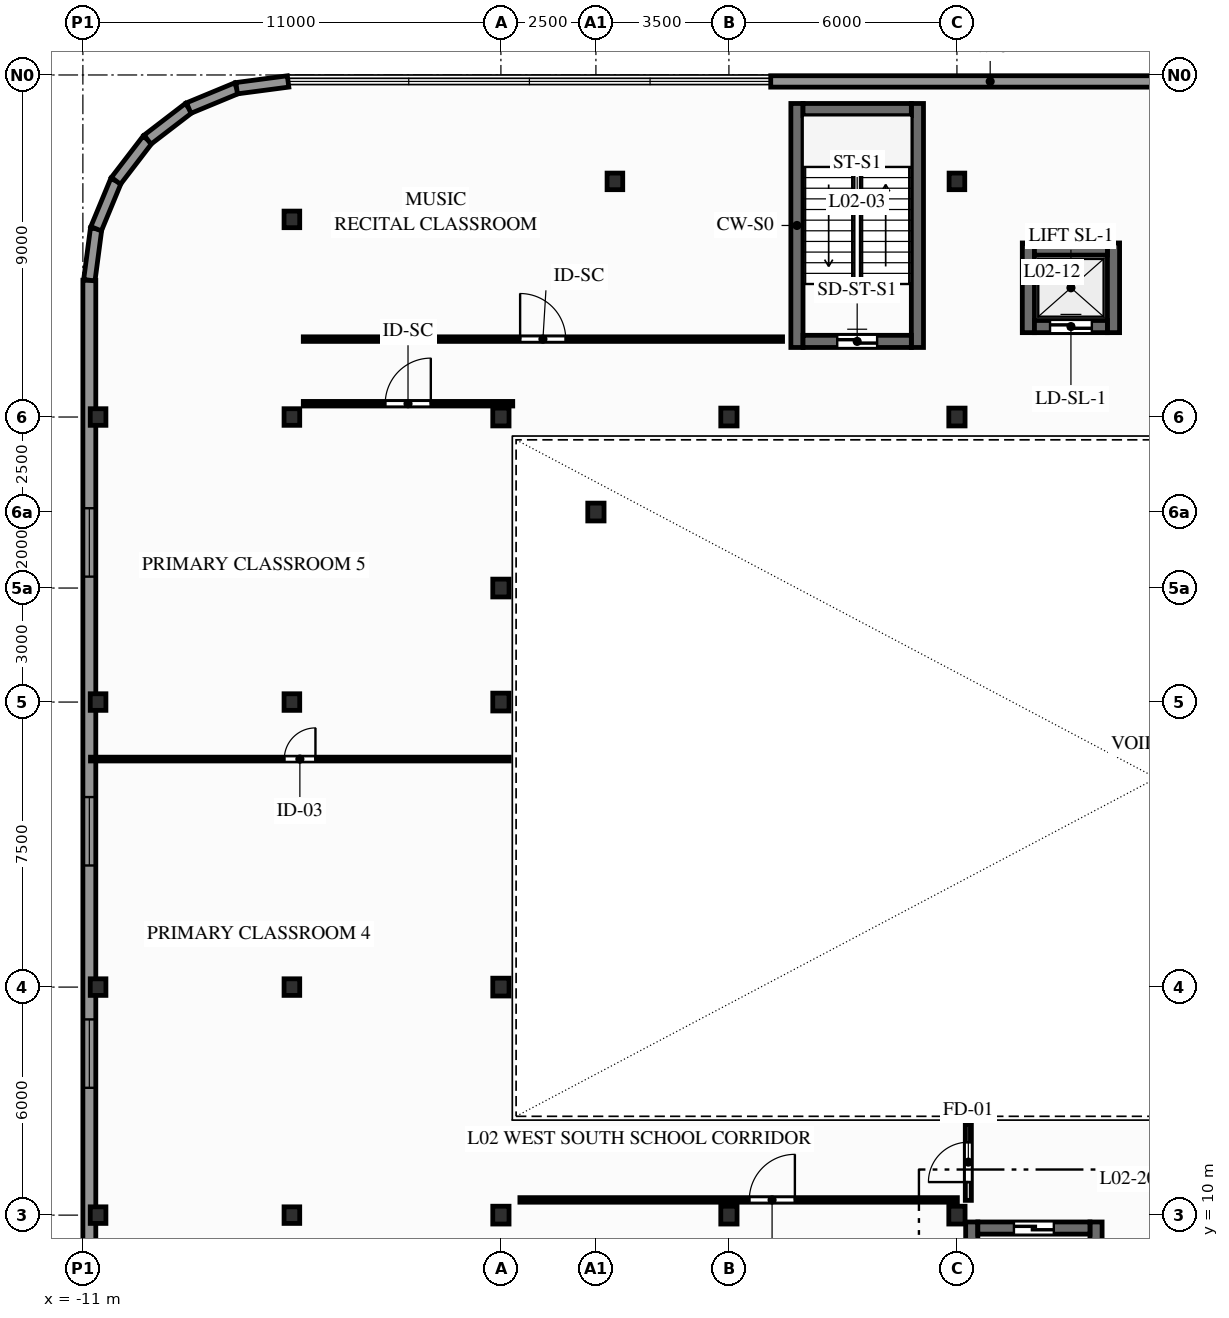
"""IFC4 building model, lengths in metres.
Left out: names, types, materials, properties, quantities, classifications, styles, units other than length and angle.
Written with IfcOpenShell. Run it as: python <this file> out.ifc"""

import sys

from ifc_helpers import new_model, si_unit, direction, frame, frame_2d, origin, origin_2d, place, context, subcontext, project, spatial, rectangle, i_section, extrude, element, fill, save


model = new_model("IFC4")
c1 = context("Model", 3, precision=1e-05, world=origin(), true_north=direction((0.0, 1.0)))
c2 = subcontext(c1, "Body", "Model", "MODEL_VIEW")
j1 = project(units=[si_unit("LENGTHUNIT", "METRE"), si_unit("PLANEANGLEUNIT", "RADIAN")], contexts=[c1])
p1 = place(None, origin())
s1 = spatial("IfcSite", under=j1, at=p1, CompositionType="ELEMENT")
p2 = place(p1, origin())
s2 = spatial("IfcBuilding", under=s1, at=p2, CompositionType="ELEMENT")
p3 = place(p2, frame((0.0, 0.0, 9.0)))
s3 = spatial("IfcBuildingStorey", under=s2, at=p3, CompositionType="ELEMENT", Elevation=9.0)
for number, where, z_axis, x_axis in (
    (1, (-10.6, 10.0, 0.0), (0.0, 0.0, 1.0), (1.0, 0.0, 0.0)),
    (2, (-10.6, 16.0, 0.0), (0.0, 0.0, 1.0), (1.0, 0.0, 0.0)),
    (3, (-10.6, 23.5, 0.0), (0.0, 0.0, 1.0), (1.0, 0.0, 0.0)),
    (4, (-10.6, 31.0, 0.0), (0.0, 0.0, 1.0), (1.0, 0.0, 0.0)),
    (5, (-5.5, 10.0, 0.0), (0.0, 0.0, 1.0), (1.0, 0.0, 0.0)),
    (6, (-5.5, 16.0, 0.0), (0.0, 0.0, 1.0), (1.0, 0.0, 0.0)),
    (7, (-5.5, 23.5, 0.0), (0.0, 0.0, 1.0), (1.0, 0.0, 0.0)),
    (8, (-5.5, 31.0, 0.0), (0.0, 0.0, 1.0), (1.0, 0.0, 0.0)),
    (9, (-5.5, 36.2, 0.0), (0.0, 0.0, 1.0), (1.0, 0.0, 0.0)),
):
    element("IfcColumn", number, at=place(p3, frame(where, z_axis=z_axis, x_axis=x_axis)), inside=s3, PredefinedType="COLUMN", context=c2, shape_type="SweptSolid", body=[
        extrude(i_section(OverallWidth=0.412, OverallDepth=0.437, WebThickness=0.036, FlangeThickness=0.058, FilletRadius=0.015, at=origin_2d()), origin(), (0.0, 0.0, 1.0), 4.5),
    ])
for number, where, z_axis, x_axis in (
    (10, (0.0, 10.0, 0.0), (0.0, 0.0, 1.0), (1.0, 0.0, 0.0)),
    (11, (0.0, 16.0, 0.0), (0.0, 0.0, 1.0), (1.0, 0.0, 0.0)),
    (12, (0.0, 23.5, 0.0), (0.0, 0.0, 1.0), (1.0, 0.0, 0.0)),
    (13, (0.0, 26.5, 0.0), (0.0, 0.0, 1.0), (1.0, 0.0, 0.0)),
    (14, (0.0, 31.0, 0.0), (0.0, 0.0, 1.0), (1.0, 0.0, 0.0)),
    (15, (2.5, 28.5, 0.0), (0.0, 0.0, 1.0), (1.0, 0.0, 0.0)),
):
    element("IfcColumn", number, at=place(p3, frame(where, z_axis=z_axis, x_axis=x_axis)), inside=s3, PredefinedType="COLUMN", context=c2, shape_type="SweptSolid", body=[
        extrude(i_section(OverallWidth=0.428, OverallDepth=0.469, WebThickness=0.078, FlangeThickness=0.125, FilletRadius=0.015, at=origin_2d()), origin(), (0.0, 0.0, 1.0), 4.5),
    ])
p4 = place(p3, frame((3.0, 37.2, 0.0), z_axis=(0.0, 0.0, 1.0), x_axis=(1.0, 0.0, 0.0)))
e16 = element("IfcColumn", 16, at=p4, inside=s3, PredefinedType="COLUMN", context=c2, shape_type="SweptSolid", body=[
    extrude(i_section(OverallWidth=0.412, OverallDepth=0.437, WebThickness=0.036, FlangeThickness=0.058, FilletRadius=0.015, at=origin_2d()), origin(), (0.0, 0.0, 1.0), 4.5),
])
for number, where, z_axis, x_axis in (
    (17, (6.0, 10.0, 0.0), (0.0, 0.0, 1.0), (1.0, 0.0, 0.0)),
    (18, (6.0, 31.0, 0.0), (0.0, 0.0, 1.0), (1.0, 0.0, 0.0)),
    (19, (12.0, 10.0, 0.0), (0.0, 0.0, 1.0), (1.0, 0.0, 0.0)),
    (20, (12.0, 31.0, 0.0), (0.0, 0.0, 1.0), (1.0, 0.0, 0.0)),
):
    element("IfcColumn", number, at=place(p3, frame(where, z_axis=z_axis, x_axis=x_axis)), inside=s3, PredefinedType="COLUMN", context=c2, shape_type="SweptSolid", body=[
        extrude(i_section(OverallWidth=0.428, OverallDepth=0.469, WebThickness=0.078, FlangeThickness=0.125, FilletRadius=0.015, at=origin_2d()), origin(), (0.0, 0.0, 1.0), 4.5),
    ])
p5 = place(p3, frame((12.0, 37.2, 0.0), z_axis=(0.0, 0.0, 1.0), x_axis=(1.0, 0.0, 0.0)))
e21 = element("IfcColumn", 21, at=p5, inside=s3, PredefinedType="COLUMN", context=c2, shape_type="SweptSolid", body=[
    extrude(i_section(OverallWidth=0.412, OverallDepth=0.437, WebThickness=0.036, FlangeThickness=0.058, FilletRadius=0.015, at=origin_2d()), origin(), (0.0, 0.0, 1.0), 4.5),
])
p6 = place(p3, frame((-10.83, 34.6, 0.0), z_axis=(0.0, 0.0, 1.0), x_axis=(0.0, -1.0, 0.0)))
e22 = element("IfcWall", 22, at=p6, inside=s3, PredefinedType="STANDARD", context=c2, shape_type="SweptSolid", body=[
    extrude(rectangle(XDim=36.43, YDim=0.34, at=frame_2d((18.215, 0.0))), origin(), (0.0, 0.0, 1.0), 3.583),
])
p7 = place(p6, frame((28.3, 0.0, 0.9)))
e23 = element("IfcOpeningElement", 23, at=p7, cuts=e22, PredefinedType="OPENING", context=c2, shape_type="SweptSolid", body=[
    extrude(rectangle(XDim=1.8, YDim=1.95, at=frame_2d((0.9, 0.975))), frame((0.0, 0.18, 0.0), z_axis=(0.0, -1.0, 0.0), x_axis=(1.0, 0.0, 0.0)), (0.0, 0.0, 1.0), 0.36),
])
p8 = place(p6, frame((19.45, 0.0, 0.9)))
e24 = element("IfcOpeningElement", 24, at=p8, cuts=e22, PredefinedType="OPENING", context=c2, shape_type="SweptSolid", body=[
    extrude(rectangle(XDim=1.8, YDim=1.95, at=frame_2d((0.9, 0.975))), frame((0.0, 0.18, 0.0), z_axis=(0.0, -1.0, 0.0), x_axis=(1.0, 0.0, 0.0)), (0.0, 0.0, 1.0), 0.36),
])
p9 = place(p6, frame((13.6, 0.0, 0.9)))
e25 = element("IfcOpeningElement", 25, at=p9, cuts=e22, PredefinedType="OPENING", context=c2, shape_type="SweptSolid", body=[
    extrude(rectangle(XDim=1.8, YDim=1.95, at=frame_2d((0.9, 0.975))), frame((0.0, 0.18, 0.0), z_axis=(0.0, -1.0, 0.0), x_axis=(1.0, 0.0, 0.0)), (0.0, 0.0, 1.0), 0.36),
])
p10 = place(p6, frame((6.0, 0.0, 0.9)))
e26 = element("IfcOpeningElement", 26, at=p10, cuts=e22, PredefinedType="OPENING", context=c2, shape_type="SweptSolid", body=[
    extrude(rectangle(XDim=1.8, YDim=1.95, at=frame_2d((0.9, 0.975))), frame((0.0, 0.18, 0.0), z_axis=(0.0, -1.0, 0.0), x_axis=(1.0, 0.0, 0.0)), (0.0, 0.0, 1.0), 0.36),
])
p11 = place(p3, frame((-10.83, 34.6, 0.0), z_axis=(0.0, 0.0, 1.0), x_axis=(0.13054703207, 0.991442117533, 0.0)))
e27 = element("IfcWall", 27, at=p11, inside=s3, PredefinedType="STANDARD", context=c2, shape_type="SweptSolid", body=[
    extrude(rectangle(XDim=1.365, YDim=0.3, at=frame_2d((0.683, 0.0))), origin(), (0.0, 0.0, 1.0), 4.22),
])
p12 = place(p3, frame((-10.652, 35.954, 0.0), z_axis=(0.0, 0.0, 1.0), x_axis=(0.382646577594, 0.923894797396, 0.0)))
e28 = element("IfcWall", 28, at=p12, inside=s3, PredefinedType="STANDARD", context=c2, shape_type="SweptSolid", body=[
    extrude(rectangle(XDim=1.365, YDim=0.3, at=frame_2d((0.683, 0.0))), origin(), (0.0, 0.0, 1.0), 4.22),
])
for number, where, z_axis, x_axis in (
    (29, (-10.129, 37.215, 0.0), (0.0, 0.0, 1.0), (0.609, 0.793, 0.0)),
    (30, (-9.298, 38.298, 0.0), (0.0, 0.0, 1.0), (0.793, 0.609, 0.0)),
):
    element("IfcWall", number, at=place(p3, frame(where, z_axis=z_axis, x_axis=x_axis)), inside=s3, PredefinedType="STANDARD", context=c2, shape_type="SweptSolid", body=[
        extrude(rectangle(XDim=1.365, YDim=0.3, at=frame_2d((0.683, 0.0))), origin(), (0.0, 0.0, 1.0), 4.22),
    ])
p13 = place(p3, frame((-8.215, 39.129, 0.0), z_axis=(0.0, 0.0, 1.0), x_axis=(0.923894797396, 0.382646577594, 0.0)))
e31 = element("IfcWall", 31, at=p13, inside=s3, PredefinedType="STANDARD", context=c2, shape_type="SweptSolid", body=[
    extrude(rectangle(XDim=1.365, YDim=0.3, at=frame_2d((0.683, 0.0))), origin(), (0.0, 0.0, 1.0), 4.22),
])
p14 = place(p3, frame((-6.954, 39.652, 0.0), z_axis=(0.0, 0.0, 1.0), x_axis=(0.991442117533, 0.13054703207, 0.0)))
e32 = element("IfcWall", 32, at=p14, inside=s3, PredefinedType="STANDARD", context=c2, shape_type="SweptSolid", body=[
    extrude(rectangle(XDim=1.365, YDim=0.3, at=frame_2d((0.683, 0.0))), origin(), (0.0, 0.0, 1.0), 4.22),
])
p15 = place(p3, frame((7.1, 39.83, 0.0), z_axis=(0.0, 0.0, 1.0), x_axis=(1.0, 0.0, 0.0)))
e33 = element("IfcWall", 33, at=p15, inside=s3, PredefinedType="STANDARD", context=c2, shape_type="SweptSolid", body=[
    extrude(rectangle(XDim=11.55, YDim=0.3, at=frame_2d((5.775, 0.0))), origin(), (0.0, 0.0, 1.0), 4.22),
])
for number, where, z_axis, x_axis in (
    (34, (12.39, 2.46, 0.0), (0.0, 0.0, 1.0), (0.0, 1.0, 0.0)),
    (35, (15.66, 2.46, 0.0), (0.0, 0.0, 1.0), (0.0, 1.0, 0.0)),
):
    element("IfcWall", number, at=place(p3, frame(where, z_axis=z_axis, x_axis=x_axis)), inside=s3, PredefinedType="SHEAR", context=c2, shape_type="SweptSolid", body=[
        extrude(rectangle(XDim=7.36, YDim=0.32, at=frame_2d((3.68, 0.0))), origin(), (0.0, 0.0, 1.0), 4.22),
    ])
p16 = place(p3, frame((15.5, 9.66, 0.0), z_axis=(0.0, 0.0, 1.0), x_axis=(-1.0, 0.0, 0.0)))
e36 = element("IfcWall", 36, at=p16, inside=s3, PredefinedType="SHEAR", context=c2, shape_type="SweptSolid", body=[
    extrude(rectangle(XDim=2.95, YDim=0.32, at=frame_2d((1.475, 0.0))), origin(), (0.0, 0.0, 1.0), 4.22),
])
p17 = place(p16, frame((0.95, 0.0, 0.0)))
e37 = element("IfcOpeningElement", 37, at=p17, cuts=e36, PredefinedType="OPENING", context=c2, shape_type="SweptSolid", body=[
    extrude(rectangle(XDim=1.05, YDim=2.06, at=frame_2d((0.525, 1.03))), frame((0.0, 0.17, 0.0), z_axis=(0.0, -1.0, 0.0), x_axis=(1.0, 0.0, 0.0)), (0.0, 0.0, 1.0), 0.34),
])
for number, where, z_axis, x_axis in (
    (38, (7.79, 32.83, 0.0), (0.0, 0.0, 1.0), (0.0, 1.0, 0.0)),
    (39, (10.96, 32.83, 0.0), (0.0, 0.0, 1.0), (0.0, 1.0, 0.0)),
):
    element("IfcWall", number, at=place(p3, frame(where, z_axis=z_axis, x_axis=x_axis)), inside=s3, PredefinedType="SHEAR", context=c2, shape_type="SweptSolid", body=[
        extrude(rectangle(XDim=6.42, YDim=0.32, at=frame_2d((3.21, 0.0))), origin(), (0.0, 0.0, 1.0), 4.22),
    ])
p18 = place(p3, frame((7.95, 32.99, 0.0), z_axis=(0.0, 0.0, 1.0), x_axis=(1.0, 0.0, 0.0)))
e40 = element("IfcWall", 40, at=p18, inside=s3, PredefinedType="SHEAR", context=c2, shape_type="SweptSolid", body=[
    extrude(rectangle(XDim=2.85, YDim=0.32, at=frame_2d((1.425, 0.0))), origin(), (0.0, 0.0, 1.0), 4.22),
])
p19 = place(p18, frame((0.9, 0.0, 0.0)))
e41 = element("IfcOpeningElement", 41, at=p19, cuts=e40, PredefinedType="OPENING", context=c2, shape_type="SweptSolid", body=[
    extrude(rectangle(XDim=1.05, YDim=2.06, at=frame_2d((0.525, 1.03))), frame((0.0, 0.17, 0.0), z_axis=(0.0, -1.0, 0.0), x_axis=(1.0, 0.0, 0.0)), (0.0, 0.0, 1.0), 0.34),
])
p20 = place(p3, frame((10.8, 39.09, 0.0), z_axis=(0.0, 0.0, 1.0), x_axis=(-1.0, 0.0, 0.0)))
e42 = element("IfcWall", 42, at=p20, inside=s3, PredefinedType="SHEAR", context=c2, shape_type="SweptSolid", body=[
    extrude(rectangle(XDim=2.85, YDim=0.32, at=frame_2d((1.425, 0.0))), origin(), (0.0, 0.0, 1.0), 4.22),
])
for number, where, z_axis, x_axis in (
    (43, (13.88, 33.22, 0.0), (0.0, 0.0, 1.0), (0.0, 1.0, 0.0)),
    (44, (16.12, 33.22, 0.0), (0.0, 0.0, 1.0), (0.0, 1.0, 0.0)),
):
    element("IfcWall", number, at=place(p3, frame(where, z_axis=z_axis, x_axis=x_axis)), inside=s3, PredefinedType="SHEAR", context=c2, shape_type="SweptSolid", body=[
        extrude(rectangle(XDim=2.36, YDim=0.32, at=frame_2d((1.18, 0.0))), origin(), (0.0, 0.0, 1.0), 4.22),
    ])
p21 = place(p3, frame((14.04, 33.38, 0.0), z_axis=(0.0, 0.0, 1.0), x_axis=(1.0, 0.0, 0.0)))
e45 = element("IfcWall", 45, at=p21, inside=s3, PredefinedType="SHEAR", context=c2, shape_type="SweptSolid", body=[
    extrude(rectangle(XDim=1.92, YDim=0.32, at=frame_2d((0.96, 0.0))), origin(), (0.0, 0.0, 1.0), 4.22),
])
p22 = place(p21, frame((0.41, 0.0, 0.0)))
e46 = element("IfcOpeningElement", 46, at=p22, cuts=e45, PredefinedType="OPENING", context=c2, shape_type="SweptSolid", body=[
    extrude(rectangle(XDim=1.1, YDim=2.06, at=frame_2d((0.55, 1.03))), frame((0.0, 0.17, 0.0), z_axis=(0.0, -1.0, 0.0), x_axis=(1.0, 0.0, 0.0)), (0.0, 0.0, 1.0), 0.34),
])
p23 = place(p3, frame((14.04, 35.42, 0.0), z_axis=(0.0, 0.0, 1.0), x_axis=(1.0, 0.0, 0.0)))
e47 = element("IfcWall", 47, at=p23, inside=s3, PredefinedType="SHEAR", context=c2, shape_type="SweptSolid", body=[
    extrude(rectangle(XDim=1.92, YDim=0.32, at=frame_2d((0.96, 0.0))), origin(), (0.0, 0.0, 1.0), 4.22),
])
p24 = place(p3, frame((12.3, 10.389, 0.0), z_axis=(0.0, 0.0, 1.0), x_axis=(0.0, 1.0, 0.0)))
e48 = element("IfcWall", 48, at=p24, inside=s3, PredefinedType="PARTITIONING", context=c2, shape_type="SweptSolid", body=[
    extrude(rectangle(XDim=2.011, YDim=0.16, at=frame_2d((1.006, 0.0))), origin(), (0.0, 0.0, 1.0), 4.22),
])
p25 = place(p24, frame((0.481, 0.0, 0.0)))
e49 = element("IfcOpeningElement", 49, at=p25, cuts=e48, PredefinedType="OPENING", context=c2, shape_type="SweptSolid", body=[
    extrude(rectangle(XDim=1.05, YDim=2.06, at=frame_2d((0.525, 1.03))), frame((0.0, 0.09, 0.0), z_axis=(0.0, -1.0, 0.0), x_axis=(1.0, 0.0, 0.0)), (0.0, 0.0, 1.0), 0.18),
])
p26 = place(p3, frame((-5.2, 31.35, 0.0), z_axis=(0.0, 0.0, 1.0), x_axis=(1.0, 0.0, 0.0)))
e50 = element("IfcWall", 50, at=p26, inside=s3, PredefinedType="PARTITIONING", context=c2, shape_type="SweptSolid", body=[
    extrude(rectangle(XDim=5.511, YDim=0.12, at=frame_2d((2.756, 0.0))), origin(), (0.0, 0.0, 1.0), 4.22),
])
p27 = place(p26, frame((2.156, 0.0, 0.0)))
e51 = element("IfcOpeningElement", 51, at=p27, cuts=e50, PredefinedType="OPENING", context=c2, shape_type="SweptSolid", body=[
    extrude(rectangle(XDim=1.2, YDim=2.08, at=frame_2d((0.6, 1.04))), frame((0.0, 0.07, 0.0), z_axis=(0.0, -1.0, 0.0), x_axis=(1.0, 0.0, 0.0)), (0.0, 0.0, 1.0), 0.14),
])
p28 = place(p3, frame((-5.2, 33.05, 0.0), z_axis=(0.0, 0.0, 1.0), x_axis=(1.0, 0.0, 0.0)))
e52 = element("IfcWall", 52, at=p28, inside=s3, PredefinedType="PARTITIONING", context=c2, shape_type="SweptSolid", body=[
    extrude(rectangle(XDim=12.611, YDim=0.12, at=frame_2d((6.306, 0.0))), origin(), (0.0, 0.0, 1.0), 4.22),
])
p29 = place(p28, frame((5.706, 0.0, 0.0)))
e53 = element("IfcOpeningElement", 53, at=p29, cuts=e52, PredefinedType="OPENING", context=c2, shape_type="SweptSolid", body=[
    extrude(rectangle(XDim=1.2, YDim=2.08, at=frame_2d((0.6, 1.04))), frame((0.0, 0.07, 0.0), z_axis=(0.0, -1.0, 0.0), x_axis=(1.0, 0.0, 0.0)), (0.0, 0.0, 1.0), 0.14),
])
p30 = place(p3, frame((0.5, 10.4, 0.0), z_axis=(0.0, 0.0, 1.0), x_axis=(1.0, 0.0, 0.0)))
e54 = element("IfcWall", 54, at=p30, inside=s3, PredefinedType="PARTITIONING", context=c2, shape_type="SweptSolid", body=[
    extrude(rectangle(XDim=11.511, YDim=0.12, at=frame_2d((5.756, 0.0))), origin(), (0.0, 0.0, 1.0), 3.344),
])
p31 = place(p30, frame((6.036, 0.0, 0.0)))
e55 = element("IfcOpeningElement", 55, at=p31, cuts=e54, PredefinedType="OPENING", context=c2, shape_type="SweptSolid", body=[
    extrude(rectangle(XDim=1.2, YDim=2.08, at=frame_2d((0.6, 1.04))), frame((0.0, 0.07, 0.0), z_axis=(0.0, -1.0, 0.0), x_axis=(1.0, 0.0, 0.0)), (0.0, 0.0, 1.0), 0.14),
])
p32 = place(p3, frame((-10.8, 22.0, 0.0), z_axis=(0.0, 0.0, 1.0), x_axis=(1.0, 0.0, 0.0)))
e56 = element("IfcWall", 56, at=p32, inside=s3, PredefinedType="PARTITIONING", context=c2, shape_type="SweptSolid", body=[
    extrude(rectangle(XDim=11.02, YDim=0.1, at=frame_2d((5.51, 0.0))), origin(), (0.0, 0.0, 1.0), 3.344),
])
p33 = place(p32, frame((5.1, 0.0, 0.0)))
e57 = element("IfcOpeningElement", 57, at=p33, cuts=e56, PredefinedType="OPENING", context=c2, shape_type="SweptSolid", body=[
    extrude(rectangle(XDim=0.82, YDim=2.02, at=frame_2d((0.41, 1.01))), frame((0.0, 0.06, 0.0), z_axis=(0.0, -1.0, 0.0), x_axis=(1.0, 0.0, 0.0)), (0.0, 0.0, 1.0), 0.12),
])
p34 = place(p8, origin())
e58 = element("IfcWindow", 58, at=p34, inside=s3, PartitioningType="SINGLE_PANEL", PredefinedType="WINDOW", context=c2, shape_type="SweptSolid", body=[
    extrude(rectangle(XDim=1.8, YDim=1.95, at=frame_2d((0.9, 0.975))), frame((0.0, 0.03, 0.0), z_axis=(0.0, -1.0, 0.0), x_axis=(1.0, 0.0, 0.0)), (0.0, 0.0, 1.0), 0.06),
])
fill(e24, e58)
p35 = place(p9, origin())
e59 = element("IfcWindow", 59, at=p35, inside=s3, PartitioningType="SINGLE_PANEL", PredefinedType="WINDOW", context=c2, shape_type="SweptSolid", body=[
    extrude(rectangle(XDim=1.8, YDim=1.95, at=frame_2d((0.9, 0.975))), frame((0.0, 0.03, 0.0), z_axis=(0.0, -1.0, 0.0), x_axis=(1.0, 0.0, 0.0)), (0.0, 0.0, 1.0), 0.06),
])
fill(e25, e59)
p36 = place(p10, origin())
e60 = element("IfcWindow", 60, at=p36, inside=s3, PartitioningType="SINGLE_PANEL", PredefinedType="WINDOW", context=c2, shape_type="SweptSolid", body=[
    extrude(rectangle(XDim=1.8, YDim=1.95, at=frame_2d((0.9, 0.975))), frame((0.0, 0.03, 0.0), z_axis=(0.0, -1.0, 0.0), x_axis=(1.0, 0.0, 0.0)), (0.0, 0.0, 1.0), 0.06),
])
fill(e26, e60)
p37 = place(p17, origin())
e61 = element("IfcDoor", 61, at=p37, inside=s3, OperationType="SINGLE_SWING_RIGHT", PredefinedType="DOOR", context=c2, shape_type="SweptSolid", body=[
    extrude(rectangle(XDim=1.05, YDim=2.06, at=frame_2d((0.525, 1.03))), frame((0.0, 0.025, 0.0), z_axis=(0.0, -1.0, 0.0), x_axis=(1.0, 0.0, 0.0)), (0.0, 0.0, 1.0), 0.05),
])
fill(e37, e61)
p38 = place(p19, origin())
e62 = element("IfcDoor", 62, at=p38, inside=s3, OperationType="SINGLE_SWING_LEFT", PredefinedType="DOOR", context=c2, shape_type="SweptSolid", body=[
    extrude(rectangle(XDim=1.05, YDim=2.06, at=frame_2d((0.525, 1.03))), frame((0.0, 0.025, 0.0), z_axis=(0.0, -1.0, 0.0), x_axis=(1.0, 0.0, 0.0)), (0.0, 0.0, 1.0), 0.05),
])
fill(e41, e62)
p39 = place(p22, origin())
e63 = element("IfcDoor", 63, at=p39, inside=s3, OperationType="SLIDING_TO_RIGHT", PredefinedType="DOOR", context=c2, shape_type="SweptSolid", body=[
    extrude(rectangle(XDim=1.1, YDim=2.06, at=frame_2d((0.55, 1.03))), frame((0.0, 0.025, 0.0), z_axis=(0.0, -1.0, 0.0), x_axis=(1.0, 0.0, 0.0)), (0.0, 0.0, 1.0), 0.05),
])
fill(e46, e63)
p40 = place(p25, origin())
e64 = element("IfcDoor", 64, at=p40, inside=s3, OperationType="SINGLE_SWING_LEFT", PredefinedType="DOOR", context=c2, shape_type="SweptSolid", body=[
    extrude(rectangle(XDim=1.05, YDim=2.06, at=frame_2d((0.525, 1.03))), frame((0.0, 0.025, 0.0), z_axis=(0.0, -1.0, 0.0), x_axis=(1.0, 0.0, 0.0)), (0.0, 0.0, 1.0), 0.05),
])
fill(e49, e64)
p41 = place(p27, origin())
e65 = element("IfcDoor", 65, at=p41, inside=s3, OperationType="SINGLE_SWING_RIGHT", PredefinedType="DOOR", context=c2, shape_type="SweptSolid", body=[
    extrude(rectangle(XDim=1.2, YDim=2.08, at=frame_2d((0.6, 1.04))), frame((0.0, 0.025, 0.0), z_axis=(0.0, -1.0, 0.0), x_axis=(1.0, 0.0, 0.0)), (0.0, 0.0, 1.0), 0.05),
])
fill(e51, e65)
p42 = place(p29, origin())
e66 = element("IfcDoor", 66, at=p42, inside=s3, OperationType="SINGLE_SWING_LEFT", PredefinedType="DOOR", context=c2, shape_type="SweptSolid", body=[
    extrude(rectangle(XDim=1.2, YDim=2.08, at=frame_2d((0.6, 1.04))), frame((0.0, 0.025, 0.0), z_axis=(0.0, -1.0, 0.0), x_axis=(1.0, 0.0, 0.0)), (0.0, 0.0, 1.0), 0.05),
])
fill(e53, e66)
p43 = place(p31, origin())
e67 = element("IfcDoor", 67, at=p43, inside=s3, OperationType="SINGLE_SWING_RIGHT", PredefinedType="DOOR", context=c2, shape_type="SweptSolid", body=[
    extrude(rectangle(XDim=1.2, YDim=2.08, at=frame_2d((0.6, 1.04))), frame((0.0, 0.025, 0.0), z_axis=(0.0, -1.0, 0.0), x_axis=(1.0, 0.0, 0.0)), (0.0, 0.0, 1.0), 0.05),
])
fill(e55, e67)
p44 = place(p33, origin())
e68 = element("IfcDoor", 68, at=p44, inside=s3, OperationType="SINGLE_SWING_RIGHT", PredefinedType="DOOR", context=c2, shape_type="SweptSolid", body=[
    extrude(rectangle(XDim=0.82, YDim=2.02, at=frame_2d((0.41, 1.01))), frame((0.0, 0.025, 0.0), z_axis=(0.0, -1.0, 0.0), x_axis=(1.0, 0.0, 0.0)), (0.0, 0.0, 1.0), 0.05),
])
fill(e57, e68)
save(model, sys.argv[1])
